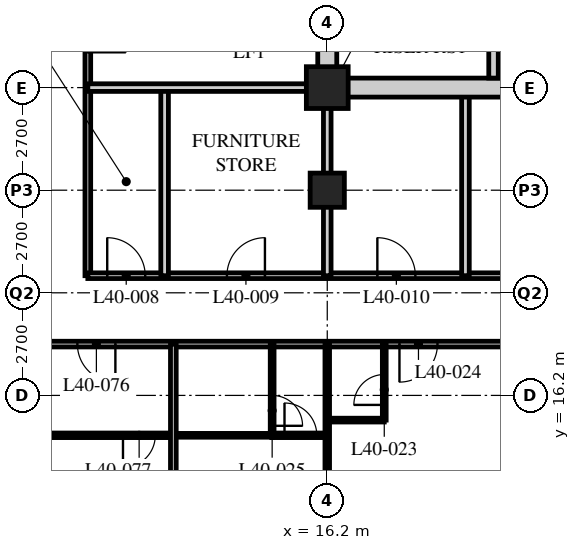
"""IFC4 building model, lengths in metres.
Left out: names, types, materials, properties, quantities, classifications, styles, units other than length and angle.
Written with IfcOpenShell. Run it as: python <this file> out.ifc"""

import sys

from ifc_helpers import new_model, si_unit, direction, frame, frame_2d, origin, origin_2d, place, context, subcontext, project, spatial, rectangle, hollow_rectangle, extrude, element, fill, save


model = new_model("IFC4")
c1 = context("Model", 3, precision=1e-05, world=origin(), true_north=direction((0.0, 1.0)))
c2 = subcontext(c1, "Body", "Model", "MODEL_VIEW")
j1 = project(units=[si_unit("LENGTHUNIT", "METRE"), si_unit("PLANEANGLEUNIT", "RADIAN")], contexts=[c1])
p1 = place(None, origin())
s1 = spatial("IfcSite", under=j1, at=p1, CompositionType="ELEMENT")
p2 = place(p1, origin())
s2 = spatial("IfcBuilding", under=s1, at=p2, CompositionType="ELEMENT")
p3 = place(p2, frame((0.0, 0.0, 154.4)))
s3 = spatial("IfcBuildingStorey", under=s2, at=p3, CompositionType="ELEMENT", Elevation=154.4)
p4 = place(p3, frame((16.2, 21.6, 0.0), z_axis=(0.0, 0.0, 1.0), x_axis=(1.0, 0.0, 0.0)))
e1 = element("IfcColumn", 1, at=p4, inside=s3, PredefinedType="COLUMN", context=c2, shape_type="SweptSolid", body=[
    extrude(hollow_rectangle(XDim=0.9, YDim=0.9, WallThickness=0.1, at=origin_2d()), origin(), (0.0, 0.0, 1.0), 3.4),
])
p5 = place(p3, frame((16.2, 24.3, 0.0), z_axis=(0.0, 0.0, 1.0), x_axis=(1.0, 0.0, 0.0)))
e2 = element("IfcColumn", 2, at=p5, inside=s3, PredefinedType="COLUMN", context=c2, shape_type="SweptSolid", body=[
    extrude(hollow_rectangle(XDim=1.1, YDim=1.1, WallThickness=0.1, at=origin_2d()), origin(), (0.0, 0.0, 1.0), 3.4),
])
p6 = place(p3, frame((8.1, 17.55, 0.0), z_axis=(0.0, 0.0, 1.0), x_axis=(1.0, 0.0, 0.0)))
e3 = element("IfcWall", 3, at=p6, inside=s3, PredefinedType="PARTITIONING", context=c2, shape_type="SweptSolid", body=[
    extrude(rectangle(XDim=40.5, YDim=0.15, at=frame_2d((20.25, 0.0))), origin(), (0.0, 0.0, 1.0), 3.15),
])
p7 = place(p6, frame((10.0, 0.0, 0.0)))
e4 = element("IfcOpeningElement", 4, at=p7, cuts=e3, PredefinedType="OPENING", context=c2, shape_type="SweptSolid", body=[
    extrude(rectangle(XDim=1.0, YDim=2.1, at=frame_2d((0.5, 1.05))), frame((0.0, 0.085, 0.0), z_axis=(0.0, -1.0, 0.0), x_axis=(1.0, 0.0, 0.0)), (0.0, 0.0, 1.0), 0.17),
])
p8 = place(p6, frame((22.15, 0.0, 0.0)))
e5 = element("IfcOpeningElement", 5, at=p8, cuts=e3, PredefinedType="OPENING", context=c2, shape_type="SweptSolid", body=[
    extrude(rectangle(XDim=1.0, YDim=2.1, at=frame_2d((0.5, 1.05))), frame((0.0, 0.085, 0.0), z_axis=(0.0, -1.0, 0.0), x_axis=(1.0, 0.0, 0.0)), (0.0, 0.0, 1.0), 0.17),
])
p9 = place(p6, frame((30.8, 0.0, 0.0)))
e6 = element("IfcOpeningElement", 6, at=p9, cuts=e3, PredefinedType="OPENING", context=c2, shape_type="SweptSolid", body=[
    extrude(rectangle(XDim=1.0, YDim=2.1, at=frame_2d((0.5, 1.05))), frame((0.0, 0.085, 0.0), z_axis=(0.0, -1.0, 0.0), x_axis=(1.0, 0.0, 0.0)), (0.0, 0.0, 1.0), 0.17),
])
p10 = place(p6, frame((34.85, 0.0, 0.0)))
e7 = element("IfcOpeningElement", 7, at=p10, cuts=e3, PredefinedType="OPENING", context=c2, shape_type="SweptSolid", body=[
    extrude(rectangle(XDim=1.0, YDim=2.1, at=frame_2d((0.5, 1.05))), frame((0.0, 0.085, 0.0), z_axis=(0.0, -1.0, 0.0), x_axis=(1.0, 0.0, 0.0)), (0.0, 0.0, 1.0), 0.17),
])
p11 = place(p6, frame((1.525, 0.0, 0.0)))
e8 = element("IfcOpeningElement", 8, at=p11, cuts=e3, PredefinedType="OPENING", context=c2, shape_type="SweptSolid", body=[
    extrude(rectangle(XDim=1.0, YDim=2.1, at=frame_2d((0.5, 1.05))), frame((0.0, 0.085, 0.0), z_axis=(0.0, -1.0, 0.0), x_axis=(1.0, 0.0, 0.0)), (0.0, 0.0, 1.0), 0.17),
])
p12 = place(p6, frame((37.975, 0.0, 0.0)))
e9 = element("IfcOpeningElement", 9, at=p12, cuts=e3, PredefinedType="OPENING", context=c2, shape_type="SweptSolid", body=[
    extrude(rectangle(XDim=1.0, YDim=2.1, at=frame_2d((0.5, 1.05))), frame((0.0, 0.085, 0.0), z_axis=(0.0, -1.0, 0.0), x_axis=(1.0, 0.0, 0.0)), (0.0, 0.0, 1.0), 0.17),
])
p13 = place(p3, frame((9.9, 44.1, 0.0), z_axis=(0.0, 0.0, 1.0), x_axis=(0.0, -1.0, 0.0)))
e10 = element("IfcWall", 10, at=p13, inside=s3, PredefinedType="PARTITIONING", context=c2, shape_type="SweptSolid", body=[
    extrude(rectangle(XDim=24.75, YDim=0.15, at=frame_2d((12.375, 0.0))), origin(), (0.0, 0.0, 1.0), 3.15),
])
p14 = place(p13, frame((17.871, 0.0, 0.0)))
e11 = element("IfcOpeningElement", 11, at=p14, cuts=e10, PredefinedType="OPENING", context=c2, shape_type="SweptSolid", body=[
    extrude(rectangle(XDim=1.0, YDim=2.1, at=frame_2d((0.5, 1.05))), frame((0.0, 0.085, 0.0), z_axis=(0.0, -1.0, 0.0), x_axis=(1.0, 0.0, 0.0)), (0.0, 0.0, 1.0), 0.17),
])
p15 = place(p13, frame((13.821, 0.0, 0.0)))
e12 = element("IfcOpeningElement", 12, at=p15, cuts=e10, PredefinedType="OPENING", context=c2, shape_type="SweptSolid", body=[
    extrude(rectangle(XDim=1.0, YDim=2.1, at=frame_2d((0.5, 1.05))), frame((0.0, 0.085, 0.0), z_axis=(0.0, -1.0, 0.0), x_axis=(1.0, 0.0, 0.0)), (0.0, 0.0, 1.0), 0.17),
])
p16 = place(p13, frame((10.4, 0.0, 0.0)))
e13 = element("IfcOpeningElement", 13, at=p16, cuts=e10, PredefinedType="OPENING", context=c2, shape_type="SweptSolid", body=[
    extrude(rectangle(XDim=1.0, YDim=2.1, at=frame_2d((0.5, 1.05))), frame((0.0, 0.085, 0.0), z_axis=(0.0, -1.0, 0.0), x_axis=(1.0, 0.0, 0.0)), (0.0, 0.0, 1.0), 0.17),
])
p17 = place(p13, frame((6.35, 0.0, 0.0)))
e14 = element("IfcOpeningElement", 14, at=p17, cuts=e10, PredefinedType="OPENING", context=c2, shape_type="SweptSolid", body=[
    extrude(rectangle(XDim=1.0, YDim=2.1, at=frame_2d((0.5, 1.05))), frame((0.0, 0.085, 0.0), z_axis=(0.0, -1.0, 0.0), x_axis=(1.0, 0.0, 0.0)), (0.0, 0.0, 1.0), 0.17),
])
p18 = place(p3, frame((9.9, 19.35, 0.0), z_axis=(0.0, 0.0, 1.0), x_axis=(1.0, 0.0, 0.0)))
e15 = element("IfcWall", 15, at=p18, inside=s3, PredefinedType="PARTITIONING", context=c2, shape_type="SweptSolid", body=[
    extrude(rectangle(XDim=17.24, YDim=0.15, at=frame_2d((8.62, 0.0))), origin(), (0.0, 0.0, 1.0), 3.15),
])
p19 = place(p18, frame((0.51, 0.0, 0.0)))
e16 = element("IfcOpeningElement", 16, at=p19, cuts=e15, PredefinedType="OPENING", context=c2, shape_type="SweptSolid", body=[
    extrude(rectangle(XDim=1.0, YDim=2.1, at=frame_2d((0.5, 1.05))), frame((0.0, 0.085, 0.0), z_axis=(0.0, -1.0, 0.0), x_axis=(1.0, 0.0, 0.0)), (0.0, 0.0, 1.0), 0.17),
])
p20 = place(p18, frame((3.66, 0.0, 0.0)))
e17 = element("IfcOpeningElement", 17, at=p20, cuts=e15, PredefinedType="OPENING", context=c2, shape_type="SweptSolid", body=[
    extrude(rectangle(XDim=1.0, YDim=2.1, at=frame_2d((0.5, 1.05))), frame((0.0, 0.085, 0.0), z_axis=(0.0, -1.0, 0.0), x_axis=(1.0, 0.0, 0.0)), (0.0, 0.0, 1.0), 0.17),
])
p21 = place(p18, frame((7.618, 0.0, 0.0)))
e18 = element("IfcOpeningElement", 18, at=p21, cuts=e15, PredefinedType="OPENING", context=c2, shape_type="SweptSolid", body=[
    extrude(rectangle(XDim=1.0, YDim=2.1, at=frame_2d((0.5, 1.05))), frame((0.0, 0.085, 0.0), z_axis=(0.0, -1.0, 0.0), x_axis=(1.0, 0.0, 0.0)), (0.0, 0.0, 1.0), 0.17),
])
p22 = place(p18, frame((13.093, 0.0, 0.0)))
e19 = element("IfcOpeningElement", 19, at=p22, cuts=e15, PredefinedType="OPENING", context=c2, shape_type="SweptSolid", body=[
    extrude(rectangle(XDim=1.0, YDim=2.1, at=frame_2d((0.5, 1.05))), frame((0.0, 0.085, 0.0), z_axis=(0.0, -1.0, 0.0), x_axis=(1.0, 0.0, 0.0)), (0.0, 0.0, 1.0), 0.17),
])
p23 = place(p3, frame((16.2, 19.35, 0.0), z_axis=(0.0, 0.0, 1.0), x_axis=(0.0, 1.0, 0.0)))
e20 = element("IfcWall", 20, at=p23, inside=s3, PredefinedType="SOLIDWALL", context=c2, shape_type="SweptSolid", body=[
    extrude(rectangle(XDim=4.95, YDim=0.2, at=frame_2d((2.475, 0.0))), origin(), (0.0, 0.0, 1.0), 2.15),
])
for number, where, z_axis, x_axis in (
    (21, (11.92, 19.35, 0.0), (0.0, 0.0, 1.0), (0.0, 1.0, 0.0)),
    (22, (19.836, 19.35, 0.0), (0.0, 0.0, 1.0), (0.0, 1.0, 0.0)),
):
    element("IfcWall", number, at=place(p3, frame(where, z_axis=z_axis, x_axis=x_axis)), inside=s3, PredefinedType="SOLIDWALL", context=c2, shape_type="SweptSolid", body=[
        extrude(rectangle(XDim=4.95, YDim=0.2, at=frame_2d((2.475, 0.0))), origin(), (0.0, 0.0, 1.0), 3.15),
    ])
p24 = place(p3, frame((9.9, 24.3, 0.0), z_axis=(0.0, 0.0, 1.0), x_axis=(1.0, 0.0, 0.0)))
e23 = element("IfcWall", 23, at=p24, inside=s3, PredefinedType="SOLIDWALL", context=c2, shape_type="SweptSolid", body=[
    extrude(rectangle(XDim=6.3, YDim=0.2, at=frame_2d((3.15, 0.0))), origin(), (0.0, 0.0, 1.0), 3.15),
])
p25 = place(p3, frame((16.2, 15.55, 0.0), z_axis=(0.0, 0.0, 1.0), x_axis=(1.0, 0.0, 0.0)))
e24 = element("IfcWall", 24, at=p25, inside=s3, PredefinedType="PARTITIONING", context=c2, shape_type="SweptSolid", body=[
    extrude(rectangle(XDim=1.5, YDim=0.1, at=frame_2d((0.75, 0.0))), origin(), (0.0, 0.0, 1.0), 3.15),
])
p26 = place(p3, frame((17.7, 17.55, 0.0), z_axis=(0.0, 0.0, 1.0), x_axis=(0.0, -1.0, 0.0)))
e25 = element("IfcWall", 25, at=p26, inside=s3, PredefinedType="PARTITIONING", context=c2, shape_type="SweptSolid", body=[
    extrude(rectangle(XDim=2.0, YDim=0.1, at=frame_2d((1.0, 0.0))), origin(), (0.0, 0.0, 1.0), 3.15),
])
p27 = place(p26, frame((0.8, 0.0, 0.0)))
e26 = element("IfcOpeningElement", 26, at=p27, cuts=e25, PredefinedType="OPENING", context=c2, shape_type="SweptSolid", body=[
    extrude(rectangle(XDim=0.8, YDim=2.1, at=frame_2d((0.4, 1.05))), frame((0.0, 0.06, 0.0), z_axis=(0.0, -1.0, 0.0), x_axis=(1.0, 0.0, 0.0)), (0.0, 0.0, 1.0), 0.12),
])
p28 = place(p3, frame((12.15, 15.15, 0.0), z_axis=(0.0, 0.0, 1.0), x_axis=(1.0, 0.0, 0.0)))
e27 = element("IfcWall", 27, at=p28, inside=s3, PredefinedType="PARTITIONING", context=c2, shape_type="SweptSolid", body=[
    extrude(rectangle(XDim=2.6, YDim=0.1, at=frame_2d((1.3, 0.0))), origin(), (0.0, 0.0, 1.0), 3.15),
])
p29 = place(p3, frame((14.75, 17.55, 0.0), z_axis=(0.0, 0.0, 1.0), x_axis=(0.0, -1.0, 0.0)))
e28 = element("IfcWall", 28, at=p29, inside=s3, PredefinedType="PARTITIONING", context=c2, shape_type="SweptSolid", body=[
    extrude(rectangle(XDim=2.4, YDim=0.1, at=frame_2d((1.2, 0.0))), origin(), (0.0, 0.0, 1.0), 3.15),
])
p30 = place(p29, frame((1.35, 0.0, 0.0)))
e29 = element("IfcOpeningElement", 29, at=p30, cuts=e28, PredefinedType="OPENING", context=c2, shape_type="SweptSolid", body=[
    extrude(rectangle(XDim=0.8, YDim=2.1, at=frame_2d((0.4, 1.05))), frame((0.0, 0.06, 0.0), z_axis=(0.0, -1.0, 0.0), x_axis=(1.0, 0.0, 0.0)), (0.0, 0.0, 1.0), 0.12),
])
p31 = place(p3, frame((16.2, 17.55, 0.0), z_axis=(0.0, 0.0, 1.0), x_axis=(0.0, -1.0, 0.0)))
e30 = element("IfcWall", 30, at=p31, inside=s3, PredefinedType="PARTITIONING", context=c2, shape_type="SweptSolid", body=[
    extrude(rectangle(XDim=11.85, YDim=0.12, at=frame_2d((5.925, 0.0))), origin(), (0.0, 0.0, 1.0), 2.15),
])
p32 = place(p31, frame((6.85, 0.0, 0.0)))
e31 = element("IfcOpeningElement", 31, at=p32, cuts=e30, PredefinedType="OPENING", context=c2, shape_type="SweptSolid", body=[
    extrude(rectangle(XDim=0.85, YDim=2.1, at=frame_2d((0.425, 1.05))), frame((0.0, 0.07, 0.0), z_axis=(0.0, -1.0, 0.0), x_axis=(1.0, 0.0, 0.0)), (0.0, 0.0, 1.0), 0.14),
])
p33 = place(p3, frame((4.1, 15.15, 0.0), z_axis=(0.0, 0.0, 1.0), x_axis=(1.0, 0.0, 0.0)))
e32 = element("IfcWall", 32, at=p33, inside=s3, PredefinedType="PARTITIONING", context=c2, shape_type="SweptSolid", body=[
    extrude(rectangle(XDim=8.05, YDim=0.12, at=frame_2d((4.025, 0.0))), origin(), (0.0, 0.0, 1.0), 3.15),
])
p34 = place(p33, frame((6.725, 0.0, 0.0)))
e33 = element("IfcOpeningElement", 33, at=p34, cuts=e32, PredefinedType="OPENING", context=c2, shape_type="SweptSolid", body=[
    extrude(rectangle(XDim=0.85, YDim=2.1, at=frame_2d((0.425, 1.05))), frame((0.0, 0.07, 0.0), z_axis=(0.0, -1.0, 0.0), x_axis=(1.0, 0.0, 0.0)), (0.0, 0.0, 1.0), 0.14),
])
p35 = place(p33, frame((2.875, 0.0, 0.0)))
e34 = element("IfcOpeningElement", 34, at=p35, cuts=e32, PredefinedType="OPENING", context=c2, shape_type="SweptSolid", body=[
    extrude(rectangle(XDim=0.85, YDim=2.1, at=frame_2d((0.425, 1.05))), frame((0.0, 0.07, 0.0), z_axis=(0.0, -1.0, 0.0), x_axis=(1.0, 0.0, 0.0)), (0.0, 0.0, 1.0), 0.14),
])
p36 = place(p3, frame((12.15, 17.55, 0.0), z_axis=(0.0, 0.0, 1.0), x_axis=(0.0, -1.0, 0.0)))
e35 = element("IfcWall", 35, at=p36, inside=s3, PredefinedType="PARTITIONING", context=c2, shape_type="SweptSolid", body=[
    extrude(rectangle(XDim=11.85, YDim=0.15, at=frame_2d((5.925, 0.0))), origin(), (0.0, 0.0, 1.0), 3.15),
])
p37 = place(p3, frame((16.2, 15.15, 0.0), z_axis=(0.0, 0.0, 1.0), x_axis=(-1.0, 0.0, 0.0)))
e36 = element("IfcWall", 36, at=p37, inside=s3, PredefinedType="PARTITIONING", context=c2, shape_type="SweptSolid", body=[
    extrude(rectangle(XDim=1.46, YDim=0.12, at=frame_2d((0.73, 0.0))), origin(), (0.0, 0.0, 1.0), 3.15),
])
p38 = place(p37, frame((0.275, 0.0, 0.0)))
e37 = element("IfcOpeningElement", 37, at=p38, cuts=e36, PredefinedType="OPENING", context=c2, shape_type="SweptSolid", body=[
    extrude(rectangle(XDim=0.85, YDim=2.1, at=frame_2d((0.425, 1.05))), frame((0.0, 0.07, 0.0), z_axis=(0.0, -1.0, 0.0), x_axis=(1.0, 0.0, 0.0)), (0.0, 0.0, 1.0), 0.14),
])
p39 = place(p3, frame((15.95, 24.3, 0.0), z_axis=(0.0, 0.0, 1.0), x_axis=(1.0, 0.0, 0.0)))
e38 = element("IfcWall", 38, at=p39, inside=s3, PredefinedType="SOLIDWALL", context=c2, shape_type="SweptSolid", body=[
    extrude(rectangle(XDim=8.35, YDim=0.5, at=frame_2d((4.175, 0.0))), origin(), (0.0, 0.0, 1.0), 2.38),
])
p40 = place(p3, frame((16.2, 24.55, 0.0), z_axis=(0.0, 0.0, 1.0), x_axis=(0.0, 1.0, 0.0)))
e39 = element("IfcWall", 39, at=p40, inside=s3, PredefinedType="SOLIDWALL", context=c2, shape_type="SweptSolid", body=[
    extrude(rectangle(XDim=15.7, YDim=0.5, at=frame_2d((7.85, 0.0))), origin(), (0.0, 0.0, 1.0), 2.15),
])
p41 = place(p3, frame((20.575, 24.55, 0.0), z_axis=(0.0, 0.0, 1.0), x_axis=(0.0, 1.0, 0.0)))
e40 = element("IfcWall", 40, at=p41, inside=s3, PredefinedType="SOLIDWALL", context=c2, shape_type="SweptSolid", body=[
    extrude(rectangle(XDim=7.75, YDim=0.25, at=frame_2d((3.875, 0.0))), origin(), (0.0, 0.0, 1.0), 3.15),
])
p42 = place(p41, frame((6.2, 0.0, 0.0)))
e41 = element("IfcOpeningElement", 41, at=p42, cuts=e40, PredefinedType="OPENING", context=c2, shape_type="SweptSolid", body=[
    extrude(rectangle(XDim=1.2, YDim=2.1, at=frame_2d((0.6, 1.05))), frame((0.0, 0.135, 0.0), z_axis=(0.0, -1.0, 0.0), x_axis=(1.0, 0.0, 0.0)), (0.0, 0.0, 1.0), 0.27),
])
p43 = place(p19, origin())
e42 = element("IfcDoor", 42, at=p43, inside=s3, OperationType="SINGLE_SWING_LEFT", PredefinedType="DOOR", context=c2, shape_type="SweptSolid", body=[
    extrude(rectangle(XDim=1.0, YDim=2.1, at=frame_2d((0.5, 1.05))), frame((0.0, 0.025, 0.0), z_axis=(0.0, -1.0, 0.0), x_axis=(1.0, 0.0, 0.0)), (0.0, 0.0, 1.0), 0.05),
])
fill(e16, e42)
p44 = place(p20, origin())
e43 = element("IfcDoor", 43, at=p44, inside=s3, OperationType="SINGLE_SWING_RIGHT", PredefinedType="DOOR", context=c2, shape_type="SweptSolid", body=[
    extrude(rectangle(XDim=1.0, YDim=2.1, at=frame_2d((0.5, 1.05))), frame((0.0, 0.025, 0.0), z_axis=(0.0, -1.0, 0.0), x_axis=(1.0, 0.0, 0.0)), (0.0, 0.0, 1.0), 0.05),
])
fill(e17, e43)
p45 = place(p21, origin())
e44 = element("IfcDoor", 44, at=p45, inside=s3, OperationType="SINGLE_SWING_LEFT", PredefinedType="DOOR", context=c2, shape_type="SweptSolid", body=[
    extrude(rectangle(XDim=1.0, YDim=2.1, at=frame_2d((0.5, 1.05))), frame((0.0, 0.025, 0.0), z_axis=(0.0, -1.0, 0.0), x_axis=(1.0, 0.0, 0.0)), (0.0, 0.0, 1.0), 0.05),
])
fill(e18, e44)
p46 = place(p27, origin())
e45 = element("IfcDoor", 45, at=p46, inside=s3, OperationType="SINGLE_SWING_LEFT", PredefinedType="DOOR", context=c2, shape_type="SweptSolid", body=[
    extrude(rectangle(XDim=0.8, YDim=2.1, at=frame_2d((0.4, 1.05))), frame((0.0, 0.025, 0.0), z_axis=(0.0, -1.0, 0.0), x_axis=(1.0, 0.0, 0.0)), (0.0, 0.0, 1.0), 0.05),
])
fill(e26, e45)
p47 = place(p7, origin())
e46 = element("IfcDoor", 46, at=p47, inside=s3, OperationType="SINGLE_SWING_RIGHT", PredefinedType="DOOR", context=c2, shape_type="SweptSolid", body=[
    extrude(rectangle(XDim=1.0, YDim=2.1, at=frame_2d((0.5, 1.05))), frame((0.0, 0.025, 0.0), z_axis=(0.0, -1.0, 0.0), x_axis=(1.0, 0.0, 0.0)), (0.0, 0.0, 1.0), 0.05),
])
fill(e4, e46)
p48 = place(p30, origin())
e47 = element("IfcDoor", 47, at=p48, inside=s3, OperationType="SINGLE_SWING_RIGHT", PredefinedType="DOOR", context=c2, shape_type="SweptSolid", body=[
    extrude(rectangle(XDim=0.8, YDim=2.1, at=frame_2d((0.4, 1.05))), frame((0.0, 0.025, 0.0), z_axis=(0.0, -1.0, 0.0), x_axis=(1.0, 0.0, 0.0)), (0.0, 0.0, 1.0), 0.05),
])
fill(e29, e47)
p49 = place(p11, origin())
e48 = element("IfcDoor", 48, at=p49, inside=s3, OperationType="SINGLE_SWING_LEFT", PredefinedType="DOOR", context=c2, shape_type="SweptSolid", body=[
    extrude(rectangle(XDim=1.0, YDim=2.1, at=frame_2d((0.5, 1.05))), frame((0.0, 0.025, 0.0), z_axis=(0.0, -1.0, 0.0), x_axis=(1.0, 0.0, 0.0)), (0.0, 0.0, 1.0), 0.05),
])
fill(e8, e48)
p50 = place(p34, origin())
e49 = element("IfcDoor", 49, at=p50, inside=s3, OperationType="SINGLE_SWING_RIGHT", PredefinedType="DOOR", context=c2, shape_type="SweptSolid", body=[
    extrude(rectangle(XDim=0.85, YDim=2.1, at=frame_2d((0.425, 1.05))), frame((0.0, 0.025, 0.0), z_axis=(0.0, -1.0, 0.0), x_axis=(1.0, 0.0, 0.0)), (0.0, 0.0, 1.0), 0.05),
])
fill(e33, e49)
p51 = place(p38, origin())
e50 = element("IfcDoor", 50, at=p51, inside=s3, OperationType="SINGLE_SWING_LEFT", PredefinedType="DOOR", context=c2, shape_type="SweptSolid", body=[
    extrude(rectangle(XDim=0.85, YDim=2.1, at=frame_2d((0.425, 1.05))), frame((0.0, 0.025, 0.0), z_axis=(0.0, -1.0, 0.0), x_axis=(1.0, 0.0, 0.0)), (0.0, 0.0, 1.0), 0.05),
])
fill(e37, e50)
save(model, sys.argv[1])
